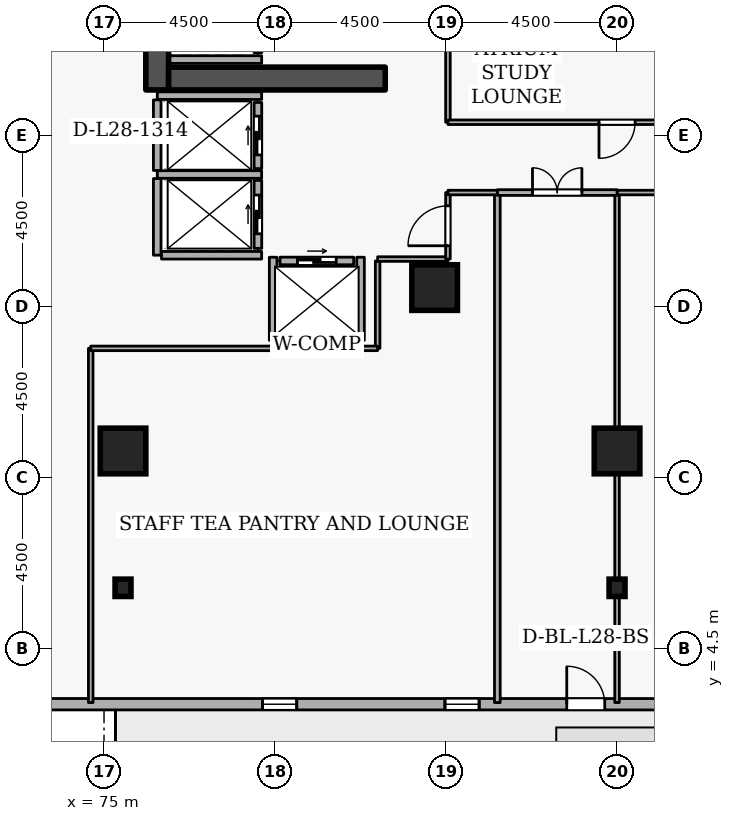
"""IFC4 building model, lengths in metres.
Left out: names, types, materials, properties, quantities, classifications, styles, units other than length and angle.
Written with IfcOpenShell. Run it as: python <this file> out.ifc"""

import sys

from ifc_helpers import new_model, si_unit, direction, frame, frame_2d, origin, origin_2d, place, context, subcontext, project, spatial, rectangle, i_section, extrude, element, fill, save


model = new_model("IFC4")
c1 = context("Model", 3, precision=1e-05, world=origin(), true_north=direction((0.0, 1.0)))
c2 = subcontext(c1, "Body", "Model", "MODEL_VIEW")
j1 = project(units=[si_unit("LENGTHUNIT", "METRE"), si_unit("PLANEANGLEUNIT", "RADIAN")], contexts=[c1])
p1 = place(None, origin())
s1 = spatial("IfcSite", under=j1, at=p1, CompositionType="ELEMENT")
p2 = place(p1, origin())
s2 = spatial("IfcBuilding", under=s1, at=p2, CompositionType="ELEMENT")
p3 = place(p2, frame((0.0, 0.0, 108.9)))
s3 = spatial("IfcBuildingStorey", under=s2, at=p3, CompositionType="ELEMENT", Elevation=108.9)
p4 = place(p3, frame((76.4, 19.2, 0.0), z_axis=(0.0, 0.0, 1.0), x_axis=(0.0, 1.0, 0.0)))
e1 = element("IfcWall", 1, at=p4, inside=s3, PredefinedType="SHEAR", context=c2, shape_type="SweptSolid", body=[
    extrude(rectangle(XDim=15.6, YDim=0.6, at=frame_2d((7.8, 0.0))), origin(), (0.0, 0.0, 1.0), 3.6),
])
p5 = place(p3, frame((76.7, 19.5, 0.0), z_axis=(0.0, 0.0, 1.0), x_axis=(1.0, 0.0, 0.0)))
e2 = element("IfcWall", 2, at=p5, inside=s3, PredefinedType="SHEAR", context=c2, shape_type="SweptSolid", body=[
    extrude(rectangle(XDim=5.7, YDim=0.6, at=frame_2d((2.85, 0.0))), origin(), (0.0, 0.0, 1.0), 3.6),
])
for number, where, z_axis, x_axis in (
    (3, (88.5, 9.7, 0.0), (0.0, 0.0, 1.0), (1.0, 0.0, 0.0)),
    (4, (75.5, 9.7, 0.0), (0.0, 0.0, 1.0), (1.0, 0.0, 0.0)),
    (5, (83.7, 14.0, 0.0), (0.0, 0.0, 1.0), (1.0, 0.0, 0.0)),
):
    element("IfcColumn", number, at=place(p3, frame(where, z_axis=z_axis, x_axis=x_axis)), inside=s3, PredefinedType="COLUMN", context=c2, shape_type="SweptSolid", body=[
        extrude(rectangle(XDim=1.2, YDim=1.2, at=origin_2d()), origin(), (0.0, 0.0, 1.0), 3.6),
    ])
for number, where, z_axis, x_axis in (
    (6, (88.5, 6.1, 0.0), (0.0, 0.0, 1.0), (1.0, 0.0, 0.0)),
    (7, (75.5, 6.1, 0.0), (0.0, 0.0, 1.0), (1.0, 0.0, 0.0)),
):
    element("IfcColumn", number, at=place(p3, frame(where, z_axis=z_axis, x_axis=x_axis)), inside=s3, PredefinedType="COLUMN", context=c2, shape_type="SweptSolid", body=[
        extrude(i_section(OverallWidth=0.418, OverallDepth=0.456, WebThickness=0.042, FlangeThickness=0.067, FilletRadius=0.015, at=origin_2d()), origin(), (0.0, 0.0, 1.0), 3.6),
    ])
p6 = place(p3, frame((67.771, 3.037, 0.0), z_axis=(0.0, 0.0, 1.0), x_axis=(0.999999998537, -5.4088042e-05, 0.0)))
e8 = element("IfcWall", 8, at=p6, inside=s3, PredefinedType="STANDARD", context=c2, shape_type="SweptSolid", body=[
    extrude(rectangle(XDim=36.11, YDim=0.3, at=frame_2d((18.055, 0.0))), origin(), (0.0, 0.0, 1.0), 2.7),
])
p7 = place(p6, frame((19.405, 0.0, 0.0)))
e9 = element("IfcOpeningElement", 9, at=p7, cuts=e8, PredefinedType="OPENING", context=c2, shape_type="SweptSolid", body=[
    extrude(rectangle(XDim=1.0, YDim=2.08, at=frame_2d((0.5, 1.04))), frame((0.0, 0.16, 0.0), z_axis=(0.0, -1.0, 0.0), x_axis=(1.0, 0.0, 0.0)), (0.0, 0.0, 1.0), 0.32),
])
p8 = place(p6, frame((1.8, 0.0, 0.72)))
e10 = element("IfcOpeningElement", 10, at=p8, cuts=e8, PredefinedType="OPENING", context=c2, shape_type="SweptSolid", body=[
    extrude(rectangle(XDim=0.9, YDim=1.75, at=frame_2d((0.45, 0.875))), frame((0.0, 0.16, 0.0), z_axis=(0.0, -1.0, 0.0), x_axis=(1.0, 0.0, 0.0)), (0.0, 0.0, 1.0), 0.32),
])
p9 = place(p6, frame((11.4, 0.0, 0.72)))
e11 = element("IfcOpeningElement", 11, at=p9, cuts=e8, PredefinedType="OPENING", context=c2, shape_type="SweptSolid", body=[
    extrude(rectangle(XDim=0.9, YDim=1.75, at=frame_2d((0.45, 0.875))), frame((0.0, 0.16, 0.0), z_axis=(0.0, -1.0, 0.0), x_axis=(1.0, 0.0, 0.0)), (0.0, 0.0, 1.0), 0.32),
])
p10 = place(p6, frame((16.2, 0.0, 0.72)))
e12 = element("IfcOpeningElement", 12, at=p10, cuts=e8, PredefinedType="OPENING", context=c2, shape_type="SweptSolid", body=[
    extrude(rectangle(XDim=0.9, YDim=1.75, at=frame_2d((0.45, 0.875))), frame((0.0, 0.16, 0.0), z_axis=(0.0, -1.0, 0.0), x_axis=(1.0, 0.0, 0.0)), (0.0, 0.0, 1.0), 0.32),
])
p11 = place(p6, frame((25.8, 0.0, 0.72)))
e13 = element("IfcOpeningElement", 13, at=p11, cuts=e8, PredefinedType="OPENING", context=c2, shape_type="SweptSolid", body=[
    extrude(rectangle(XDim=0.9, YDim=1.75, at=frame_2d((0.45, 0.875))), frame((0.0, 0.16, 0.0), z_axis=(0.0, -1.0, 0.0), x_axis=(1.0, 0.0, 0.0)), (0.0, 0.0, 1.0), 0.32),
])
p12 = place(p6, frame((30.6, 0.0, 0.72)))
e14 = element("IfcOpeningElement", 14, at=p12, cuts=e8, PredefinedType="OPENING", context=c2, shape_type="SweptSolid", body=[
    extrude(rectangle(XDim=0.9, YDim=1.75, at=frame_2d((0.45, 0.875))), frame((0.0, 0.16, 0.0), z_axis=(0.0, -1.0, 0.0), x_axis=(1.0, 0.0, 0.0)), (0.0, 0.0, 1.0), 0.32),
])
p13 = place(p3, frame((79.05, 20.18, 0.0), z_axis=(0.0, 0.0, 1.0), x_axis=(0.0, 1.0, 0.0)))
e15 = element("IfcWall", 15, at=p13, inside=s3, PredefinedType="STANDARD", context=c2, shape_type="SweptSolid", body=[
    extrude(rectangle(XDim=1.94, YDim=0.2, at=frame_2d((0.97, 0.0))), origin(), (0.0, 0.0, 1.0), 3.34),
])
p14 = place(p3, frame((79.05, 17.13, 0.0), z_axis=(0.0, 0.0, 1.0), x_axis=(0.0, 1.0, 0.0)))
e16 = element("IfcWall", 16, at=p14, inside=s3, PredefinedType="STANDARD", context=c2, shape_type="SweptSolid", body=[
    extrude(rectangle(XDim=1.74, YDim=0.2, at=frame_2d((0.87, 0.0))), origin(), (0.0, 0.0, 1.0), 3.34),
])
p15 = place(p14, frame((0.36, 0.0, 0.0)))
e17 = element("IfcOpeningElement", 17, at=p15, cuts=e16, PredefinedType="OPENING", context=c2, shape_type="SweptSolid", body=[
    extrude(rectangle(XDim=1.02, YDim=2.06, at=frame_2d((0.51, 1.03))), frame((0.0, 0.11, 0.0), z_axis=(0.0, -1.0, 0.0), x_axis=(1.0, 0.0, 0.0)), (0.0, 0.0, 1.0), 0.22),
])
p16 = place(p3, frame((79.05, 15.03, 0.0), z_axis=(0.0, 0.0, 1.0), x_axis=(0.0, 1.0, 0.0)))
e18 = element("IfcWall", 18, at=p16, inside=s3, PredefinedType="STANDARD", context=c2, shape_type="SweptSolid", body=[
    extrude(rectangle(XDim=1.79, YDim=0.2, at=frame_2d((0.895, 0.0))), origin(), (0.0, 0.0, 1.0), 3.34),
])
p17 = place(p16, frame((0.385, 0.0, 0.0)))
e19 = element("IfcOpeningElement", 19, at=p17, cuts=e18, PredefinedType="OPENING", context=c2, shape_type="SweptSolid", body=[
    extrude(rectangle(XDim=1.02, YDim=2.06, at=frame_2d((0.51, 1.03))), frame((0.0, 0.11, 0.0), z_axis=(0.0, -1.0, 0.0), x_axis=(1.0, 0.0, 0.0)), (0.0, 0.0, 1.0), 0.22),
])
p18 = place(p3, frame((79.63, 14.7, 0.0), z_axis=(0.0, 0.0, 1.0), x_axis=(1.0, 0.0, 0.0)))
e20 = element("IfcWall", 20, at=p18, inside=s3, PredefinedType="STANDARD", context=c2, shape_type="SweptSolid", body=[
    extrude(rectangle(XDim=1.94, YDim=0.2, at=frame_2d((0.97, 0.0))), origin(), (0.0, 0.0, 1.0), 3.34),
])
p19 = place(p18, frame((0.46, 0.0, 0.0)))
e21 = element("IfcOpeningElement", 21, at=p19, cuts=e20, PredefinedType="OPENING", context=c2, shape_type="SweptSolid", body=[
    extrude(rectangle(XDim=1.02, YDim=2.06, at=frame_2d((0.51, 1.03))), frame((0.0, 0.11, 0.0), z_axis=(0.0, -1.0, 0.0), x_axis=(1.0, 0.0, 0.0)), (0.0, 0.0, 1.0), 0.22),
])
p20 = place(p3, frame((76.712, 20.0, 0.0), z_axis=(0.0, 0.0, 1.0), x_axis=(1.0, 0.0, 0.0)))
e22 = element("IfcWall", 22, at=p20, inside=s3, PredefinedType="STANDARD", context=c2, shape_type="SweptSolid", body=[
    extrude(rectangle(XDim=2.436, YDim=0.2, at=frame_2d((1.218, 0.0))), origin(), (0.0, 0.0, 1.0), 3.34),
])
p21 = place(p3, frame((76.402, 19.05, 0.0), z_axis=(0.0, 0.0, 1.0), x_axis=(1.0, 0.0, 0.0)))
e23 = element("IfcWall", 23, at=p21, inside=s3, PredefinedType="STANDARD", context=c2, shape_type="SweptSolid", body=[
    extrude(rectangle(XDim=2.746, YDim=0.2, at=frame_2d((1.373, 0.0))), origin(), (0.0, 0.0, 1.0), 2.545),
])
p22 = place(p3, frame((76.402, 16.975, 0.0), z_axis=(0.0, 0.0, 1.0), x_axis=(1.0, 0.0, 0.0)))
e24 = element("IfcWall", 24, at=p22, inside=s3, PredefinedType="STANDARD", context=c2, shape_type="SweptSolid", body=[
    extrude(rectangle(XDim=2.746, YDim=0.2, at=frame_2d((1.373, 0.0))), origin(), (0.0, 0.0, 1.0), 3.34),
])
p23 = place(p3, frame((76.4, 14.852, 0.0), z_axis=(0.0, 0.0, 1.0), x_axis=(0.0, 1.0, 0.0)))
e25 = element("IfcWall", 25, at=p23, inside=s3, PredefinedType="STANDARD", context=c2, shape_type="SweptSolid", body=[
    extrude(rectangle(XDim=2.016, YDim=0.2, at=frame_2d((1.008, 0.0))), origin(), (0.0, 0.0, 1.0), 3.34),
])
p24 = place(p3, frame((76.4, 17.082, 0.0), z_axis=(0.0, 0.0, 1.0), x_axis=(0.0, 1.0, 0.0)))
e26 = element("IfcWall", 26, at=p24, inside=s3, PredefinedType="STANDARD", context=c2, shape_type="SweptSolid", body=[
    extrude(rectangle(XDim=1.856, YDim=0.2, at=frame_2d((0.928, 0.0))), origin(), (0.0, 0.0, 1.0), 3.34),
])
p25 = place(p3, frame((76.512, 14.85, 0.0), z_axis=(0.0, 0.0, 1.0), x_axis=(1.0, 0.0, 0.0)))
e27 = element("IfcWall", 27, at=p25, inside=s3, PredefinedType="STANDARD", context=c2, shape_type="SweptSolid", body=[
    extrude(rectangle(XDim=2.636, YDim=0.2, at=frame_2d((1.318, 0.0))), origin(), (0.0, 0.0, 1.0), 3.34),
])
p26 = place(p3, frame((79.452, 12.5, 0.0), z_axis=(0.0, 0.0, 1.0), x_axis=(1.0, 0.0, 0.0)))
e28 = element("IfcWall", 28, at=p26, inside=s3, PredefinedType="STANDARD", context=c2, shape_type="SweptSolid", body=[
    extrude(rectangle(XDim=2.296, YDim=0.2, at=frame_2d((1.148, 0.0))), origin(), (0.0, 0.0, 1.0), 3.34),
])
for number, where, z_axis, x_axis in (
    (29, (81.75, 12.612, 0.0), (0.0, 0.0, 1.0), (0.0, 1.0, 0.0)),
    (30, (79.45, 12.612, 0.0), (0.0, 0.0, 1.0), (0.0, 1.0, 0.0)),
):
    element("IfcWall", number, at=place(p3, frame(where, z_axis=z_axis, x_axis=x_axis)), inside=s3, PredefinedType="STANDARD", context=c2, shape_type="SweptSolid", body=[
        extrude(rectangle(XDim=2.186, YDim=0.2, at=frame_2d((1.093, 0.0))), origin(), (0.0, 0.0, 1.0), 3.34),
    ])
p27 = place(p3, frame((88.5, 3.08, 0.0), z_axis=(0.0, 0.0, 1.0), x_axis=(0.0, 1.0, 0.0)))
e31 = element("IfcWall", 31, at=p27, inside=s3, PredefinedType="PARTITIONING", context=c2, shape_type="SweptSolid", body=[
    extrude(rectangle(XDim=13.42, YDim=0.12, at=frame_2d((6.71, 0.0))), origin(), (0.0, 0.0, 1.0), 2.882),
])
p28 = place(p3, frame((88.5, 16.5, 0.0), z_axis=(0.0, 0.0, 1.0), x_axis=(1.0, 0.0, 0.0)))
e32 = element("IfcWall", 32, at=p28, inside=s3, PredefinedType="PARTITIONING", context=c2, shape_type="SweptSolid", body=[
    extrude(rectangle(XDim=4.45, YDim=0.12, at=frame_2d((2.225, 0.0))), origin(), (0.0, 0.0, 1.0), 3.34),
])
p29 = place(p28, frame((1.7, 0.0, 0.0)))
e33 = element("IfcOpeningElement", 33, at=p29, cuts=e32, PredefinedType="OPENING", context=c2, shape_type="SweptSolid", body=[
    extrude(rectangle(XDim=1.05, YDim=2.1, at=frame_2d((0.525, 1.05))), frame((0.0, 0.07, 0.0), z_axis=(0.0, -1.0, 0.0), x_axis=(1.0, 0.0, 0.0)), (0.0, 0.0, 1.0), 0.14),
])
p30 = place(p3, frame((85.35, 3.08, 0.0), z_axis=(0.0, 0.0, 1.0), x_axis=(0.0, 1.0, 0.0)))
e34 = element("IfcWall", 34, at=p30, inside=s3, PredefinedType="PARTITIONING", context=c2, shape_type="SweptSolid", body=[
    extrude(rectangle(XDim=13.42, YDim=0.15, at=frame_2d((6.71, 0.0))), origin(), (0.0, 0.0, 1.0), 3.34),
])
p31 = place(p3, frame((85.35, 16.5, 0.0), z_axis=(0.0, 0.0, 1.0), x_axis=(1.0, 0.0, 0.0)))
e35 = element("IfcWall", 35, at=p31, inside=s3, PredefinedType="PARTITIONING", context=c2, shape_type="SweptSolid", body=[
    extrude(rectangle(XDim=3.15, YDim=0.15, at=frame_2d((1.575, 0.0))), origin(), (0.0, 0.0, 1.0), 3.34),
])
p32 = place(p31, frame((0.925, 0.0, 0.0)))
e36 = element("IfcOpeningElement", 36, at=p32, cuts=e35, PredefinedType="OPENING", context=c2, shape_type="SweptSolid", body=[
    extrude(rectangle(XDim=1.3, YDim=2.12, at=frame_2d((0.65, 1.06))), frame((0.0, 0.085, 0.0), z_axis=(0.0, -1.0, 0.0), x_axis=(1.0, 0.0, 0.0)), (0.0, 0.0, 1.0), 0.17),
])
p33 = place(p3, frame((82.2, 12.4, 0.0), z_axis=(0.0, 0.0, 1.0), x_axis=(0.0, 1.0, 0.0)))
e37 = element("IfcWall", 37, at=p33, inside=s3, PredefinedType="PARTITIONING", context=c2, shape_type="SweptSolid", body=[
    extrude(rectangle(XDim=2.3, YDim=0.12, at=frame_2d((1.15, 0.0))), origin(), (0.0, 0.0, 1.0), 3.34),
])
p34 = place(p3, frame((82.2, 14.75, 0.0), z_axis=(0.0, 0.0, 1.0), x_axis=(1.0, 0.0, 0.0)))
e38 = element("IfcWall", 38, at=p34, inside=s3, PredefinedType="PARTITIONING", context=c2, shape_type="SweptSolid", body=[
    extrude(rectangle(XDim=1.85, YDim=0.12, at=frame_2d((0.925, 0.0))), origin(), (0.0, 0.0, 1.0), 3.34),
])
p35 = place(p3, frame((84.05, 14.75, 0.0), z_axis=(0.0, 0.0, 1.0), x_axis=(0.0, 1.0, 0.0)))
e39 = element("IfcWall", 39, at=p35, inside=s3, PredefinedType="PARTITIONING", context=c2, shape_type="SweptSolid", body=[
    extrude(rectangle(XDim=1.75, YDim=0.12, at=frame_2d((0.875, 0.0))), origin(), (0.0, 0.0, 1.0), 3.34),
])
p36 = place(p35, frame((0.35, 0.0, 0.0)))
e40 = element("IfcOpeningElement", 40, at=p36, cuts=e39, PredefinedType="OPENING", context=c2, shape_type="SweptSolid", body=[
    extrude(rectangle(XDim=1.05, YDim=2.1, at=frame_2d((0.525, 1.05))), frame((0.0, 0.07, 0.0), z_axis=(0.0, -1.0, 0.0), x_axis=(1.0, 0.0, 0.0)), (0.0, 0.0, 1.0), 0.14),
])
p37 = place(p3, frame((84.05, 16.5, 0.0), z_axis=(0.0, 0.0, 1.0), x_axis=(1.0, 0.0, 0.0)))
e41 = element("IfcWall", 41, at=p37, inside=s3, PredefinedType="PARTITIONING", context=c2, shape_type="SweptSolid", body=[
    extrude(rectangle(XDim=1.3, YDim=0.12, at=frame_2d((0.65, 0.0))), origin(), (0.0, 0.0, 1.0), 3.34),
])
p38 = place(p3, frame((74.65, 3.08, 0.0), z_axis=(0.0, 0.0, 1.0), x_axis=(0.0, 1.0, 0.0)))
e42 = element("IfcWall", 42, at=p38, inside=s3, PredefinedType="PARTITIONING", context=c2, shape_type="SweptSolid", body=[
    extrude(rectangle(XDim=9.32, YDim=0.12, at=frame_2d((4.66, 0.0))), origin(), (0.0, 0.0, 1.0), 3.34),
])
p39 = place(p3, frame((74.65, 12.4, 0.0), z_axis=(0.0, 0.0, 1.0), x_axis=(1.0, 0.0, 0.0)))
e43 = element("IfcWall", 43, at=p39, inside=s3, PredefinedType="PARTITIONING", context=c2, shape_type="SweptSolid", body=[
    extrude(rectangle(XDim=4.802, YDim=0.12, at=frame_2d((2.401, 0.0))), origin(), (0.0, 0.0, 1.0), 3.34),
])
p40 = place(p3, frame((81.748, 12.4, 0.0), z_axis=(0.0, 0.0, 1.0), x_axis=(1.0, 0.0, 0.0)))
e44 = element("IfcWall", 44, at=p40, inside=s3, PredefinedType="PARTITIONING", context=c2, shape_type="SweptSolid", body=[
    extrude(rectangle(XDim=0.452, YDim=0.12, at=frame_2d((0.226, 0.0))), origin(), (0.0, 0.0, 1.0), 3.34),
])
p41 = place(p3, frame((84.05, 18.35, 0.0), z_axis=(0.0, 0.0, 1.0), x_axis=(0.0, 1.0, 0.0)))
e45 = element("IfcWall", 45, at=p41, inside=s3, PredefinedType="PARTITIONING", context=c2, shape_type="SweptSolid", body=[
    extrude(rectangle(XDim=3.45, YDim=0.12, at=frame_2d((1.725, 0.0))), origin(), (0.0, 0.0, 1.0), 3.34),
])
p42 = place(p3, frame((92.95, 18.35, 0.0), z_axis=(0.0, 0.0, 1.0), x_axis=(-1.0, 0.0, 0.0)))
e46 = element("IfcWall", 46, at=p42, inside=s3, PredefinedType="PARTITIONING", context=c2, shape_type="SweptSolid", body=[
    extrude(rectangle(XDim=8.9, YDim=0.12, at=frame_2d((4.45, 0.0))), origin(), (0.0, 0.0, 1.0), 3.34),
])
p43 = place(p42, frame((3.975, 0.0, 0.0)))
e47 = element("IfcOpeningElement", 47, at=p43, cuts=e46, PredefinedType="OPENING", context=c2, shape_type="SweptSolid", body=[
    extrude(rectangle(XDim=0.95, YDim=2.1, at=frame_2d((0.475, 1.05))), frame((0.0, 0.07, 0.0), z_axis=(0.0, -1.0, 0.0), x_axis=(1.0, 0.0, 0.0)), (0.0, 0.0, 1.0), 0.14),
])
p44 = place(p7, origin())
e48 = element("IfcDoor", 48, at=p44, inside=s3, OperationType="SINGLE_SWING_LEFT", PredefinedType="DOOR", context=c2, shape_type="SweptSolid", body=[
    extrude(rectangle(XDim=1.0, YDim=2.08, at=frame_2d((0.5, 1.04))), frame((0.0, 0.025, 0.0), z_axis=(0.0, -1.0, 0.0), x_axis=(1.0, 0.0, 0.0)), (0.0, 0.0, 1.0), 0.05),
])
fill(e9, e48)
p45 = place(p9, origin())
e49 = element("IfcWindow", 49, at=p45, inside=s3, PartitioningType="SINGLE_PANEL", PredefinedType="WINDOW", context=c2, shape_type="SweptSolid", body=[
    extrude(rectangle(XDim=0.9, YDim=1.75, at=frame_2d((0.45, 0.875))), frame((0.0, 0.03, 0.0), z_axis=(0.0, -1.0, 0.0), x_axis=(1.0, 0.0, 0.0)), (0.0, 0.0, 1.0), 0.06),
])
fill(e11, e49)
p46 = place(p10, origin())
e50 = element("IfcWindow", 50, at=p46, inside=s3, PartitioningType="SINGLE_PANEL", PredefinedType="WINDOW", context=c2, shape_type="SweptSolid", body=[
    extrude(rectangle(XDim=0.9, YDim=1.75, at=frame_2d((0.45, 0.875))), frame((0.0, 0.03, 0.0), z_axis=(0.0, -1.0, 0.0), x_axis=(1.0, 0.0, 0.0)), (0.0, 0.0, 1.0), 0.06),
])
fill(e12, e50)
p47 = place(p15, origin())
e51 = element("IfcDoor", 51, at=p47, inside=s3, OperationType="SLIDING_TO_LEFT", PredefinedType="DOOR", context=c2, shape_type="SweptSolid", body=[
    extrude(rectangle(XDim=1.02, YDim=2.06, at=frame_2d((0.51, 1.03))), frame((0.0, 0.025, 0.0), z_axis=(0.0, -1.0, 0.0), x_axis=(1.0, 0.0, 0.0)), (0.0, 0.0, 1.0), 0.05),
])
fill(e17, e51)
p48 = place(p17, origin())
e52 = element("IfcDoor", 52, at=p48, inside=s3, OperationType="SLIDING_TO_LEFT", PredefinedType="DOOR", context=c2, shape_type="SweptSolid", body=[
    extrude(rectangle(XDim=1.02, YDim=2.06, at=frame_2d((0.51, 1.03))), frame((0.0, 0.025, 0.0), z_axis=(0.0, -1.0, 0.0), x_axis=(1.0, 0.0, 0.0)), (0.0, 0.0, 1.0), 0.05),
])
fill(e19, e52)
p49 = place(p19, origin())
e53 = element("IfcDoor", 53, at=p49, inside=s3, OperationType="SLIDING_TO_LEFT", PredefinedType="DOOR", context=c2, shape_type="SweptSolid", body=[
    extrude(rectangle(XDim=1.02, YDim=2.06, at=frame_2d((0.51, 1.03))), frame((0.0, 0.025, 0.0), z_axis=(0.0, -1.0, 0.0), x_axis=(1.0, 0.0, 0.0)), (0.0, 0.0, 1.0), 0.05),
])
fill(e21, e53)
p50 = place(p32, origin())
e54 = element("IfcDoor", 54, at=p50, inside=s3, OperationType="DOUBLE_DOOR_SINGLE_SWING", PredefinedType="DOOR", context=c2, shape_type="SweptSolid", body=[
    extrude(rectangle(XDim=1.3, YDim=2.12, at=frame_2d((0.65, 1.06))), frame((0.0, 0.025, 0.0), z_axis=(0.0, -1.0, 0.0), x_axis=(1.0, 0.0, 0.0)), (0.0, 0.0, 1.0), 0.05),
])
fill(e36, e54)
p51 = place(p36, origin())
e55 = element("IfcDoor", 55, at=p51, inside=s3, OperationType="SINGLE_SWING_LEFT", PredefinedType="DOOR", context=c2, shape_type="SweptSolid", body=[
    extrude(rectangle(XDim=1.05, YDim=2.1, at=frame_2d((0.525, 1.05))), frame((0.0, 0.025, 0.0), z_axis=(0.0, -1.0, 0.0), x_axis=(1.0, 0.0, 0.0)), (0.0, 0.0, 1.0), 0.05),
])
fill(e40, e55)
p52 = place(p43, origin())
e56 = element("IfcDoor", 56, at=p52, inside=s3, OperationType="SINGLE_SWING_RIGHT", PredefinedType="DOOR", context=c2, shape_type="SweptSolid", body=[
    extrude(rectangle(XDim=0.95, YDim=2.1, at=frame_2d((0.475, 1.05))), frame((0.0, 0.025, 0.0), z_axis=(0.0, -1.0, 0.0), x_axis=(1.0, 0.0, 0.0)), (0.0, 0.0, 1.0), 0.05),
])
fill(e47, e56)
save(model, sys.argv[1])
